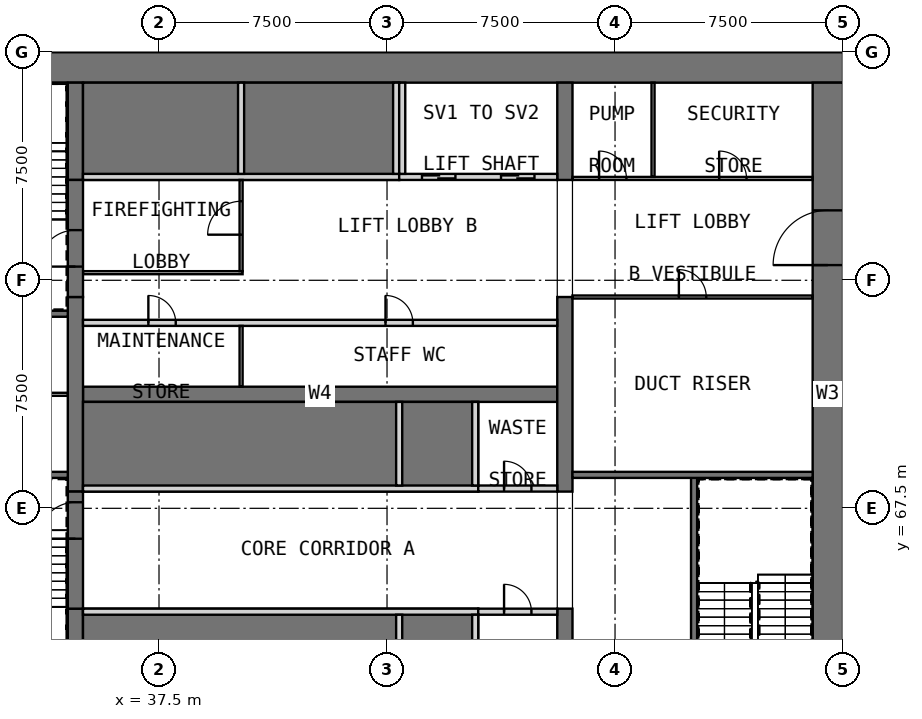
"""IFC4 building model, lengths in metres.
Left out: names, types, materials, properties, quantities, classifications, styles, units other than length and angle.
Written with IfcOpenShell. Run it as: python <this file> out.ifc"""

import sys

from ifc_helpers import new_model, si_unit, direction, frame, frame_2d, origin, place, context, subcontext, project, spatial, rectangle, extrude, element, fill, save


model = new_model("IFC4")
c1 = context("Model", 3, precision=1e-05, world=origin(), true_north=direction((0.0, 1.0)))
c2 = subcontext(c1, "Body", "Model", "MODEL_VIEW")
j1 = project(units=[si_unit("LENGTHUNIT", "METRE"), si_unit("PLANEANGLEUNIT", "RADIAN")], contexts=[c1])
p1 = place(None, origin())
s1 = spatial("IfcSite", under=j1, at=p1, CompositionType="ELEMENT")
p2 = place(p1, origin())
s2 = spatial("IfcBuilding", under=s1, at=p2, CompositionType="ELEMENT")
p3 = place(p2, frame((0.0, 0.0, -6.0)))
s3 = spatial("IfcBuildingStorey", under=s2, at=p3, CompositionType="ELEMENT", Elevation=-6.0)
p4 = place(p3, frame((30.0, 82.0, 0.0), z_axis=(0.0, 0.0, 1.0), x_axis=(1.0, 0.0, 0.0)))
e1 = element("IfcWall", 1, at=p4, inside=s3, PredefinedType="SHEAR", context=c2, shape_type="SweptSolid", body=[
    extrude(rectangle(XDim=30.0, YDim=1.0, at=frame_2d((15.0, 0.0))), origin(), (0.0, 0.0, 1.0), 6.0),
])
p5 = place(p3, frame((59.5, 61.0, 0.0), z_axis=(0.0, 0.0, 1.0), x_axis=(0.0, 1.0, 0.0)))
e2 = element("IfcWall", 2, at=p5, inside=s3, PredefinedType="SHEAR", context=c2, shape_type="SweptSolid", body=[
    extrude(rectangle(XDim=20.5, YDim=1.0, at=frame_2d((10.25, 0.0))), origin(), (0.0, 0.0, 1.0), 6.0),
])
p6 = place(p5, frame((14.5, 0.0, 0.0)))
e3 = element("IfcOpeningElement", 3, at=p6, cuts=e2, PredefinedType="OPENING", context=c2, shape_type="SweptSolid", body=[
    extrude(rectangle(XDim=1.8, YDim=2.1, at=frame_2d((0.9, 1.05))), frame((0.0, 0.51, 0.0), z_axis=(0.0, -1.0, 0.0), x_axis=(1.0, 0.0, 0.0)), (0.0, 0.0, 1.0), 1.02),
])
p7 = place(p3, frame((35.0, 71.25, 0.0), z_axis=(0.0, 0.0, 1.0), x_axis=(1.0, 0.0, 0.0)))
e4 = element("IfcWall", 4, at=p7, inside=s3, PredefinedType="SHEAR", context=c2, shape_type="SweptSolid", body=[
    extrude(rectangle(XDim=15.6, YDim=0.5, at=frame_2d((7.8, 0.0))), origin(), (0.0, 0.0, 1.0), 6.0),
])
p8 = place(p3, frame((34.75, 61.0, 0.0), z_axis=(0.0, 0.0, 1.0), x_axis=(0.0, 1.0, 0.0)))
e5 = element("IfcWall", 5, at=p8, inside=s3, PredefinedType="SHEAR", context=c2, shape_type="SweptSolid", body=[
    extrude(rectangle(XDim=3.2, YDim=0.5, at=frame_2d((1.6, 0.0))), origin(), (0.0, 0.0, 1.0), 6.0),
])
p9 = place(p3, frame((34.75, 68.05, 0.0), z_axis=(0.0, 0.0, 1.0), x_axis=(0.0, 1.0, 0.0)))
e6 = element("IfcWall", 6, at=p9, inside=s3, PredefinedType="SHEAR", context=c2, shape_type="SweptSolid", body=[
    extrude(rectangle(XDim=6.4, YDim=0.5, at=frame_2d((3.2, 0.0))), origin(), (0.0, 0.0, 1.0), 6.0),
])
for number, where, z_axis, x_axis in (
    (7, (34.75, 78.3, 0.0), (0.0, 0.0, 1.0), (0.0, 1.0, 0.0)),
    (8, (50.85, 61.0, 0.0), (0.0, 0.0, 1.0), (0.0, 1.0, 0.0)),
):
    element("IfcWall", number, at=place(p3, frame(where, z_axis=z_axis, x_axis=x_axis)), inside=s3, PredefinedType="SHEAR", context=c2, shape_type="SweptSolid", body=[
        extrude(rectangle(XDim=3.2, YDim=0.5, at=frame_2d((1.6, 0.0))), origin(), (0.0, 0.0, 1.0), 6.0),
    ])
p10 = place(p3, frame((50.85, 68.05, 0.0), z_axis=(0.0, 0.0, 1.0), x_axis=(0.0, 1.0, 0.0)))
e9 = element("IfcWall", 9, at=p10, inside=s3, PredefinedType="SHEAR", context=c2, shape_type="SweptSolid", body=[
    extrude(rectangle(XDim=6.4, YDim=0.5, at=frame_2d((3.2, 0.0))), origin(), (0.0, 0.0, 1.0), 6.0),
])
p11 = place(p3, frame((50.85, 78.3, 0.0), z_axis=(0.0, 0.0, 1.0), x_axis=(0.0, 1.0, 0.0)))
e10 = element("IfcWall", 10, at=p11, inside=s3, PredefinedType="SHEAR", context=c2, shape_type="SweptSolid", body=[
    extrude(rectangle(XDim=3.2, YDim=0.5, at=frame_2d((1.6, 0.0))), origin(), (0.0, 0.0, 1.0), 6.0),
])
p12 = place(p3, frame((35.0, 62.6, 0.0), z_axis=(0.0, 0.0, 1.0), x_axis=(1.0, 0.0, 0.0)))
e11 = element("IfcWall", 11, at=p12, inside=s3, PredefinedType="SOLIDWALL", context=c2, shape_type="SweptSolid", body=[
    extrude(rectangle(XDim=13.0, YDim=3.2, at=frame_2d((6.5, 0.0))), origin(), (0.0, 0.0, 1.0), 4.4),
])
p13 = place(p3, frame((35.0, 64.1, 4.4), z_axis=(0.0, 0.0, 1.0), x_axis=(1.0, 0.0, 0.0)))
e12 = element("IfcWall", 12, at=p13, inside=s3, PredefinedType="SOLIDWALL", context=c2, shape_type="SweptSolid", body=[
    extrude(rectangle(XDim=13.0, YDim=0.2, at=frame_2d((6.5, 0.0))), origin(), (0.0, 0.0, 1.0), 1.6),
])
for number, where, z_axis, x_axis in (
    (13, (45.4, 61.0, 4.4), (0.0, 0.0, 1.0), (0.0, 1.0, 0.0)),
    (14, (47.9, 61.0, 4.4), (0.0, 0.0, 1.0), (0.0, 1.0, 0.0)),
):
    element("IfcWall", number, at=place(p3, frame(where, z_axis=z_axis, x_axis=x_axis)), inside=s3, PredefinedType="SOLIDWALL", context=c2, shape_type="SweptSolid", body=[
        extrude(rectangle(XDim=3.0, YDim=0.2, at=frame_2d((1.5, 0.0))), origin(), (0.0, 0.0, 1.0), 1.6),
    ])
p14 = place(p3, frame((48.0, 64.1, 0.0), z_axis=(0.0, 0.0, 1.0), x_axis=(1.0, 0.0, 0.0)))
e15 = element("IfcWall", 15, at=p14, inside=s3, PredefinedType="PARTITIONING", context=c2, shape_type="SweptSolid", body=[
    extrude(rectangle(XDim=2.6, YDim=0.2, at=frame_2d((1.3, 0.0))), origin(), (0.0, 0.0, 1.0), 5.7),
])
p15 = place(p14, frame((0.85, 0.0, 0.0)))
e16 = element("IfcOpeningElement", 16, at=p15, cuts=e15, PredefinedType="OPENING", context=c2, shape_type="SweptSolid", body=[
    extrude(rectangle(XDim=0.9, YDim=2.1, at=frame_2d((0.45, 1.05))), frame((0.0, 0.11, 0.0), z_axis=(0.0, -1.0, 0.0), x_axis=(1.0, 0.0, 0.0)), (0.0, 0.0, 1.0), 0.22),
])
p16 = place(p3, frame((35.0, 69.525, 0.0), z_axis=(0.0, 0.0, 1.0), x_axis=(1.0, 0.0, 0.0)))
e17 = element("IfcWall", 17, at=p16, inside=s3, PredefinedType="SOLIDWALL", context=c2, shape_type="SweptSolid", body=[
    extrude(rectangle(XDim=13.0, YDim=2.95, at=frame_2d((6.5, 0.0))), origin(), (0.0, 0.0, 1.0), 4.4),
])
p17 = place(p3, frame((35.0, 68.15, 4.4), z_axis=(0.0, 0.0, 1.0), x_axis=(1.0, 0.0, 0.0)))
e18 = element("IfcWall", 18, at=p17, inside=s3, PredefinedType="SOLIDWALL", context=c2, shape_type="SweptSolid", body=[
    extrude(rectangle(XDim=13.0, YDim=0.2, at=frame_2d((6.5, 0.0))), origin(), (0.0, 0.0, 1.0), 1.6),
])
for number, where, z_axis, x_axis in (
    (19, (45.4, 68.25, 4.4), (0.0, 0.0, 1.0), (0.0, 1.0, 0.0)),
    (20, (47.9, 68.25, 4.4), (0.0, 0.0, 1.0), (0.0, 1.0, 0.0)),
):
    element("IfcWall", number, at=place(p3, frame(where, z_axis=z_axis, x_axis=x_axis)), inside=s3, PredefinedType="SOLIDWALL", context=c2, shape_type="SweptSolid", body=[
        extrude(rectangle(XDim=2.75, YDim=0.2, at=frame_2d((1.375, 0.0))), origin(), (0.0, 0.0, 1.0), 1.6),
    ])
p18 = place(p3, frame((48.0, 68.15, 0.0), z_axis=(0.0, 0.0, 1.0), x_axis=(1.0, 0.0, 0.0)))
e21 = element("IfcWall", 21, at=p18, inside=s3, PredefinedType="PARTITIONING", context=c2, shape_type="SweptSolid", body=[
    extrude(rectangle(XDim=2.6, YDim=0.2, at=frame_2d((1.3, 0.0))), origin(), (0.0, 0.0, 1.0), 5.7),
])
p19 = place(p18, frame((0.85, 0.0, 0.0)))
e22 = element("IfcOpeningElement", 22, at=p19, cuts=e21, PredefinedType="OPENING", context=c2, shape_type="SweptSolid", body=[
    extrude(rectangle(XDim=0.9, YDim=2.1, at=frame_2d((0.45, 1.05))), frame((0.0, 0.11, 0.0), z_axis=(0.0, -1.0, 0.0), x_axis=(1.0, 0.0, 0.0)), (0.0, 0.0, 1.0), 0.22),
])
p20 = place(p3, frame((35.0, 73.6, 0.0), z_axis=(0.0, 0.0, 1.0), x_axis=(1.0, 0.0, 0.0)))
e23 = element("IfcWall", 23, at=p20, inside=s3, PredefinedType="PARTITIONING", context=c2, shape_type="SweptSolid", body=[
    extrude(rectangle(XDim=15.6, YDim=0.2, at=frame_2d((7.8, 0.0))), origin(), (0.0, 0.0, 1.0), 5.7),
])
p21 = place(p20, frame((2.15, 0.0, 0.0)))
e24 = element("IfcOpeningElement", 24, at=p21, cuts=e23, PredefinedType="OPENING", context=c2, shape_type="SweptSolid", body=[
    extrude(rectangle(XDim=0.9, YDim=2.1, at=frame_2d((0.45, 1.05))), frame((0.0, 0.11, 0.0), z_axis=(0.0, -1.0, 0.0), x_axis=(1.0, 0.0, 0.0)), (0.0, 0.0, 1.0), 0.22),
])
p22 = place(p20, frame((9.95, 0.0, 0.0)))
e25 = element("IfcOpeningElement", 25, at=p22, cuts=e23, PredefinedType="OPENING", context=c2, shape_type="SweptSolid", body=[
    extrude(rectangle(XDim=0.9, YDim=2.1, at=frame_2d((0.45, 1.05))), frame((0.0, 0.11, 0.0), z_axis=(0.0, -1.0, 0.0), x_axis=(1.0, 0.0, 0.0)), (0.0, 0.0, 1.0), 0.22),
])
p23 = place(p3, frame((40.2, 71.5, 0.0), z_axis=(0.0, 0.0, 1.0), x_axis=(0.0, 1.0, 0.0)))
e26 = element("IfcWall", 26, at=p23, inside=s3, PredefinedType="PARTITIONING", context=c2, shape_type="SweptSolid", body=[
    extrude(rectangle(XDim=2.0, YDim=0.1, at=frame_2d((1.0, 0.0))), origin(), (0.0, 0.0, 1.0), 5.7),
])
p24 = place(p3, frame((35.0, 79.9, 0.0), z_axis=(0.0, 0.0, 1.0), x_axis=(1.0, 0.0, 0.0)))
e27 = element("IfcWall", 27, at=p24, inside=s3, PredefinedType="SOLIDWALL", context=c2, shape_type="SweptSolid", body=[
    extrude(rectangle(XDim=10.4, YDim=3.2, at=frame_2d((5.2, 0.0))), origin(), (0.0, 0.0, 1.0), 4.4),
])
p25 = place(p3, frame((35.0, 78.4, 4.4), z_axis=(0.0, 0.0, 1.0), x_axis=(1.0, 0.0, 0.0)))
e28 = element("IfcWall", 28, at=p25, inside=s3, PredefinedType="SOLIDWALL", context=c2, shape_type="SweptSolid", body=[
    extrude(rectangle(XDim=10.4, YDim=0.2, at=frame_2d((5.2, 0.0))), origin(), (0.0, 0.0, 1.0), 1.6),
])
for number, where, z_axis, x_axis in (
    (29, (40.2, 78.5, 4.4), (0.0, 0.0, 1.0), (0.0, 1.0, 0.0)),
    (30, (45.3, 78.5, 4.4), (0.0, 0.0, 1.0), (0.0, 1.0, 0.0)),
):
    element("IfcWall", number, at=place(p3, frame(where, z_axis=z_axis, x_axis=x_axis)), inside=s3, PredefinedType="SOLIDWALL", context=c2, shape_type="SweptSolid", body=[
        extrude(rectangle(XDim=3.0, YDim=0.2, at=frame_2d((1.5, 0.0))), origin(), (0.0, 0.0, 1.0), 1.6),
    ])
p26 = place(p3, frame((45.4, 78.4, 0.0), z_axis=(0.0, 0.0, 1.0), x_axis=(1.0, 0.0, 0.0)))
e31 = element("IfcWall", 31, at=p26, inside=s3, PredefinedType="SOLIDWALL", context=c2, shape_type="SweptSolid", body=[
    extrude(rectangle(XDim=5.2, YDim=0.2, at=frame_2d((2.6, 0.0))), origin(), (0.0, 0.0, 1.0), 6.0),
])
p27 = place(p26, frame((0.75, 0.0, 0.0)))
e32 = element("IfcOpeningElement", 32, at=p27, cuts=e31, PredefinedType="OPENING", context=c2, shape_type="SweptSolid", body=[
    extrude(rectangle(XDim=1.1, YDim=2.1, at=frame_2d((0.55, 1.05))), frame((0.0, 0.11, 0.0), z_axis=(0.0, -1.0, 0.0), x_axis=(1.0, 0.0, 0.0)), (0.0, 0.0, 1.0), 0.22),
])
p28 = place(p26, frame((3.35, 0.0, 0.0)))
e33 = element("IfcOpeningElement", 33, at=p28, cuts=e31, PredefinedType="OPENING", context=c2, shape_type="SweptSolid", body=[
    extrude(rectangle(XDim=1.1, YDim=2.1, at=frame_2d((0.55, 1.05))), frame((0.0, 0.11, 0.0), z_axis=(0.0, -1.0, 0.0), x_axis=(1.0, 0.0, 0.0)), (0.0, 0.0, 1.0), 0.22),
])
p29 = place(p3, frame((45.5, 78.5, 0.0), z_axis=(0.0, 0.0, 1.0), x_axis=(0.0, 1.0, 0.0)))
e34 = element("IfcWall", 34, at=p29, inside=s3, PredefinedType="SOLIDWALL", context=c2, shape_type="SweptSolid", body=[
    extrude(rectangle(XDim=3.0, YDim=0.2, at=frame_2d((1.5, 0.0))), origin(), (0.0, 0.0, 1.0), 6.0),
])
p30 = place(p3, frame((35.0, 75.25, 0.0), z_axis=(0.0, 0.0, 1.0), x_axis=(1.0, 0.0, 0.0)))
e35 = element("IfcWall", 35, at=p30, inside=s3, PredefinedType="PARTITIONING", context=c2, shape_type="SweptSolid", body=[
    extrude(rectangle(XDim=5.25, YDim=0.1, at=frame_2d((2.625, 0.0))), origin(), (0.0, 0.0, 1.0), 5.7),
])
p31 = place(p3, frame((40.2, 75.3, 0.0), z_axis=(0.0, 0.0, 1.0), x_axis=(0.0, 1.0, 0.0)))
e36 = element("IfcWall", 36, at=p31, inside=s3, PredefinedType="PARTITIONING", context=c2, shape_type="SweptSolid", body=[
    extrude(rectangle(XDim=3.0, YDim=0.1, at=frame_2d((1.5, 0.0))), origin(), (0.0, 0.0, 1.0), 5.7),
])
p32 = place(p31, frame((1.2, 0.0, 0.0)))
e37 = element("IfcOpeningElement", 37, at=p32, cuts=e36, PredefinedType="OPENING", context=c2, shape_type="SweptSolid", body=[
    extrude(rectangle(XDim=1.1, YDim=2.1, at=frame_2d((0.55, 1.05))), frame((0.0, 0.06, 0.0), z_axis=(0.0, -1.0, 0.0), x_axis=(1.0, 0.0, 0.0)), (0.0, 0.0, 1.0), 0.12),
])
p33 = place(p3, frame((34.75, 64.2, 0.0), z_axis=(0.0, 0.0, 1.0), x_axis=(0.0, 1.0, 0.0)))
e38 = element("IfcWall", 38, at=p33, inside=s3, PredefinedType="SOLIDWALL", context=c2, shape_type="SweptSolid", body=[
    extrude(rectangle(XDim=3.85, YDim=0.5, at=frame_2d((1.925, 0.0))), origin(), (0.0, 0.0, 1.0), 4.8),
])
p34 = place(p33, frame((2.3, 0.0, 0.0)))
e39 = element("IfcOpeningElement", 39, at=p34, cuts=e38, PredefinedType="OPENING", context=c2, shape_type="SweptSolid", body=[
    extrude(rectangle(XDim=1.2, YDim=2.1, at=frame_2d((0.6, 1.05))), frame((0.0, 0.26, 0.0), z_axis=(0.0, -1.0, 0.0), x_axis=(1.0, 0.0, 0.0)), (0.0, 0.0, 1.0), 0.52),
])
p35 = place(p3, frame((34.75, 74.45, 0.0), z_axis=(0.0, 0.0, 1.0), x_axis=(0.0, 1.0, 0.0)))
e40 = element("IfcWall", 40, at=p35, inside=s3, PredefinedType="SOLIDWALL", context=c2, shape_type="SweptSolid", body=[
    extrude(rectangle(XDim=3.85, YDim=0.5, at=frame_2d((1.925, 0.0))), origin(), (0.0, 0.0, 1.0), 4.8),
])
p36 = place(p35, frame((1.0, 0.0, 0.0)))
e41 = element("IfcOpeningElement", 41, at=p36, cuts=e40, PredefinedType="OPENING", context=c2, shape_type="SweptSolid", body=[
    extrude(rectangle(XDim=1.2, YDim=2.1, at=frame_2d((0.6, 1.05))), frame((0.0, 0.26, 0.0), z_axis=(0.0, -1.0, 0.0), x_axis=(1.0, 0.0, 0.0)), (0.0, 0.0, 1.0), 0.52),
])
p37 = place(p3, frame((31.0, 68.6, 0.0), z_axis=(0.0, 0.0, 1.0), x_axis=(1.0, 0.0, 0.0)))
e42 = element("IfcWall", 42, at=p37, inside=s3, PredefinedType="SOLIDWALL", context=c2, shape_type="SweptSolid", body=[
    extrude(rectangle(XDim=3.5, YDim=0.2, at=frame_2d((1.75, 0.0))), origin(), (0.0, 0.0, 1.0), 5.7),
])
p38 = place(p37, frame((1.3, 0.0, 0.0)))
e43 = element("IfcOpeningElement", 43, at=p38, cuts=e42, PredefinedType="OPENING", context=c2, shape_type="SweptSolid", body=[
    extrude(rectangle(XDim=0.9, YDim=2.1, at=frame_2d((0.45, 1.05))), frame((0.0, 0.11, 0.0), z_axis=(0.0, -1.0, 0.0), x_axis=(1.0, 0.0, 0.0)), (0.0, 0.0, 1.0), 0.22),
])
p39 = place(p3, frame((31.0, 73.9, 0.0), z_axis=(0.0, 0.0, 1.0), x_axis=(1.0, 0.0, 0.0)))
e44 = element("IfcWall", 44, at=p39, inside=s3, PredefinedType="SOLIDWALL", context=c2, shape_type="SweptSolid", body=[
    extrude(rectangle(XDim=3.5, YDim=0.2, at=frame_2d((1.75, 0.0))), origin(), (0.0, 0.0, 1.0), 5.7),
])
p40 = place(p39, frame((1.3, 0.0, 0.0)))
e45 = element("IfcOpeningElement", 45, at=p40, cuts=e44, PredefinedType="OPENING", context=c2, shape_type="SweptSolid", body=[
    extrude(rectangle(XDim=0.9, YDim=2.1, at=frame_2d((0.45, 1.05))), frame((0.0, 0.11, 0.0), z_axis=(0.0, -1.0, 0.0), x_axis=(1.0, 0.0, 0.0)), (0.0, 0.0, 1.0), 0.22),
])
p41 = place(p3, frame((55.1, 61.0, 0.0), z_axis=(0.0, 0.0, 1.0), x_axis=(0.0, 1.0, 0.0)))
e46 = element("IfcWall", 46, at=p41, inside=s3, PredefinedType="SOLIDWALL", context=c2, shape_type="SweptSolid", body=[
    extrude(rectangle(XDim=7.6, YDim=0.2, at=frame_2d((3.8, 0.0))), origin(), (0.0, 0.0, 1.0), 5.7),
])
p42 = place(p3, frame((51.1, 68.6, 0.0), z_axis=(0.0, 0.0, 1.0), x_axis=(1.0, 0.0, 0.0)))
e47 = element("IfcWall", 47, at=p42, inside=s3, PredefinedType="SOLIDWALL", context=c2, shape_type="SweptSolid", body=[
    extrude(rectangle(XDim=7.9, YDim=0.2, at=frame_2d((3.95, 0.0))), origin(), (0.0, 0.0, 1.0), 5.7),
])
p43 = place(p3, frame((31.0, 71.25, 0.0), z_axis=(0.0, 0.0, 1.0), x_axis=(1.0, 0.0, 0.0)))
e48 = element("IfcWall", 48, at=p43, inside=s3, PredefinedType="PARTITIONING", context=c2, shape_type="SweptSolid", body=[
    extrude(rectangle(XDim=3.5, YDim=0.1, at=frame_2d((1.75, 0.0))), origin(), (0.0, 0.0, 1.0), 5.7),
])
p44 = place(p3, frame((51.1, 74.45, 0.0), z_axis=(0.0, 0.0, 1.0), x_axis=(1.0, 0.0, 0.0)))
e49 = element("IfcWall", 49, at=p44, inside=s3, PredefinedType="PARTITIONING", context=c2, shape_type="SweptSolid", body=[
    extrude(rectangle(XDim=7.9, YDim=0.1, at=frame_2d((3.95, 0.0))), origin(), (0.0, 0.0, 1.0), 5.7),
])
p45 = place(p44, frame((3.5, 0.0, 0.0)))
e50 = element("IfcOpeningElement", 50, at=p45, cuts=e49, PredefinedType="OPENING", context=c2, shape_type="SweptSolid", body=[
    extrude(rectangle(XDim=0.9, YDim=2.1, at=frame_2d((0.45, 1.05))), frame((0.0, 0.06, 0.0), z_axis=(0.0, -1.0, 0.0), x_axis=(1.0, 0.0, 0.0)), (0.0, 0.0, 1.0), 0.12),
])
p46 = place(p3, frame((51.1, 78.35, 0.0), z_axis=(0.0, 0.0, 1.0), x_axis=(1.0, 0.0, 0.0)))
e51 = element("IfcWall", 51, at=p46, inside=s3, PredefinedType="PARTITIONING", context=c2, shape_type="SweptSolid", body=[
    extrude(rectangle(XDim=7.9, YDim=0.1, at=frame_2d((3.95, 0.0))), origin(), (0.0, 0.0, 1.0), 5.7),
])
p47 = place(p46, frame((0.875, 0.0, 0.0)))
e52 = element("IfcOpeningElement", 52, at=p47, cuts=e51, PredefinedType="OPENING", context=c2, shape_type="SweptSolid", body=[
    extrude(rectangle(XDim=0.9, YDim=2.1, at=frame_2d((0.45, 1.05))), frame((0.0, 0.06, 0.0), z_axis=(0.0, -1.0, 0.0), x_axis=(1.0, 0.0, 0.0)), (0.0, 0.0, 1.0), 0.12),
])
p48 = place(p46, frame((4.825, 0.0, 0.0)))
e53 = element("IfcOpeningElement", 53, at=p48, cuts=e51, PredefinedType="OPENING", context=c2, shape_type="SweptSolid", body=[
    extrude(rectangle(XDim=0.9, YDim=2.1, at=frame_2d((0.45, 1.05))), frame((0.0, 0.06, 0.0), z_axis=(0.0, -1.0, 0.0), x_axis=(1.0, 0.0, 0.0)), (0.0, 0.0, 1.0), 0.12),
])
p49 = place(p3, frame((53.75, 78.4, 0.0), z_axis=(0.0, 0.0, 1.0), x_axis=(0.0, 1.0, 0.0)))
e54 = element("IfcWall", 54, at=p49, inside=s3, PredefinedType="PARTITIONING", context=c2, shape_type="SweptSolid", body=[
    extrude(rectangle(XDim=3.1, YDim=0.1, at=frame_2d((1.55, 0.0))), origin(), (0.0, 0.0, 1.0), 5.7),
])
p50 = place(p15, origin())
e55 = element("IfcDoor", 55, at=p50, inside=s3, OperationType="SINGLE_SWING_LEFT", PredefinedType="DOOR", context=c2, shape_type="SweptSolid", body=[
    extrude(rectangle(XDim=0.9, YDim=2.1, at=frame_2d((0.45, 1.05))), frame((0.0, 0.025, 0.0), z_axis=(0.0, -1.0, 0.0), x_axis=(1.0, 0.0, 0.0)), (0.0, 0.0, 1.0), 0.05),
])
fill(e16, e55)
p51 = place(p19, origin())
e56 = element("IfcDoor", 56, at=p51, inside=s3, OperationType="SINGLE_SWING_LEFT", PredefinedType="DOOR", context=c2, shape_type="SweptSolid", body=[
    extrude(rectangle(XDim=0.9, YDim=2.1, at=frame_2d((0.45, 1.05))), frame((0.0, 0.025, 0.0), z_axis=(0.0, -1.0, 0.0), x_axis=(1.0, 0.0, 0.0)), (0.0, 0.0, 1.0), 0.05),
])
fill(e22, e56)
p52 = place(p21, origin())
e57 = element("IfcDoor", 57, at=p52, inside=s3, OperationType="SINGLE_SWING_LEFT", PredefinedType="DOOR", context=c2, shape_type="SweptSolid", body=[
    extrude(rectangle(XDim=0.9, YDim=2.1, at=frame_2d((0.45, 1.05))), frame((0.0, 0.025, 0.0), z_axis=(0.0, -1.0, 0.0), x_axis=(1.0, 0.0, 0.0)), (0.0, 0.0, 1.0), 0.05),
])
fill(e24, e57)
p53 = place(p22, origin())
e58 = element("IfcDoor", 58, at=p53, inside=s3, OperationType="SINGLE_SWING_RIGHT", PredefinedType="DOOR", context=c2, shape_type="SweptSolid", body=[
    extrude(rectangle(XDim=0.9, YDim=2.1, at=frame_2d((0.45, 1.05))), frame((0.0, 0.025, 0.0), z_axis=(0.0, -1.0, 0.0), x_axis=(1.0, 0.0, 0.0)), (0.0, 0.0, 1.0), 0.05),
])
fill(e25, e58)
p54 = place(p27, origin())
e59 = element("IfcDoor", 59, at=p54, inside=s3, OperationType="DOUBLE_DOOR_SLIDING", PredefinedType="DOOR", context=c2, shape_type="SweptSolid", body=[
    extrude(rectangle(XDim=1.1, YDim=2.1, at=frame_2d((0.55, 1.05))), frame((0.0, 0.025, 0.0), z_axis=(0.0, -1.0, 0.0), x_axis=(1.0, 0.0, 0.0)), (0.0, 0.0, 1.0), 0.05),
])
fill(e32, e59)
p55 = place(p28, origin())
e60 = element("IfcDoor", 60, at=p55, inside=s3, OperationType="DOUBLE_DOOR_SLIDING", PredefinedType="DOOR", context=c2, shape_type="SweptSolid", body=[
    extrude(rectangle(XDim=1.1, YDim=2.1, at=frame_2d((0.55, 1.05))), frame((0.0, 0.025, 0.0), z_axis=(0.0, -1.0, 0.0), x_axis=(1.0, 0.0, 0.0)), (0.0, 0.0, 1.0), 0.05),
])
fill(e33, e60)
p56 = place(p6, origin())
e61 = element("IfcDoor", 61, at=p56, inside=s3, OperationType="DOUBLE_DOOR_SINGLE_SWING", PredefinedType="DOOR", context=c2, shape_type="SweptSolid", body=[
    extrude(rectangle(XDim=1.8, YDim=2.1, at=frame_2d((0.9, 1.05))), frame((0.0, 0.025, 0.0), z_axis=(0.0, -1.0, 0.0), x_axis=(1.0, 0.0, 0.0)), (0.0, 0.0, 1.0), 0.05),
])
fill(e3, e61)
p57 = place(p32, origin())
e62 = element("IfcDoor", 62, at=p57, inside=s3, OperationType="SINGLE_SWING_LEFT", PredefinedType="DOOR", context=c2, shape_type="SweptSolid", body=[
    extrude(rectangle(XDim=1.1, YDim=2.1, at=frame_2d((0.55, 1.05))), frame((0.0, 0.025, 0.0), z_axis=(0.0, -1.0, 0.0), x_axis=(1.0, 0.0, 0.0)), (0.0, 0.0, 1.0), 0.05),
])
fill(e37, e62)
p58 = place(p34, origin())
e63 = element("IfcDoor", 63, at=p58, inside=s3, OperationType="SINGLE_SWING_LEFT", PredefinedType="DOOR", context=c2, shape_type="SweptSolid", body=[
    extrude(rectangle(XDim=1.2, YDim=2.1, at=frame_2d((0.6, 1.05))), frame((0.0, 0.025, 0.0), z_axis=(0.0, -1.0, 0.0), x_axis=(1.0, 0.0, 0.0)), (0.0, 0.0, 1.0), 0.05),
])
fill(e39, e63)
p59 = place(p36, origin())
e64 = element("IfcDoor", 64, at=p59, inside=s3, OperationType="SINGLE_SWING_RIGHT", PredefinedType="DOOR", context=c2, shape_type="SweptSolid", body=[
    extrude(rectangle(XDim=1.2, YDim=2.1, at=frame_2d((0.6, 1.05))), frame((0.0, 0.025, 0.0), z_axis=(0.0, -1.0, 0.0), x_axis=(1.0, 0.0, 0.0)), (0.0, 0.0, 1.0), 0.05),
])
fill(e41, e64)
p60 = place(p45, origin())
e65 = element("IfcDoor", 65, at=p60, inside=s3, OperationType="SINGLE_SWING_LEFT", PredefinedType="DOOR", context=c2, shape_type="SweptSolid", body=[
    extrude(rectangle(XDim=0.9, YDim=2.1, at=frame_2d((0.45, 1.05))), frame((0.0, 0.025, 0.0), z_axis=(0.0, -1.0, 0.0), x_axis=(1.0, 0.0, 0.0)), (0.0, 0.0, 1.0), 0.05),
])
fill(e50, e65)
p61 = place(p47, origin())
e66 = element("IfcDoor", 66, at=p61, inside=s3, OperationType="SINGLE_SWING_LEFT", PredefinedType="DOOR", context=c2, shape_type="SweptSolid", body=[
    extrude(rectangle(XDim=0.9, YDim=2.1, at=frame_2d((0.45, 1.05))), frame((0.0, 0.025, 0.0), z_axis=(0.0, -1.0, 0.0), x_axis=(1.0, 0.0, 0.0)), (0.0, 0.0, 1.0), 0.05),
])
fill(e52, e66)
p62 = place(p48, origin())
e67 = element("IfcDoor", 67, at=p62, inside=s3, OperationType="SINGLE_SWING_RIGHT", PredefinedType="DOOR", context=c2, shape_type="SweptSolid", body=[
    extrude(rectangle(XDim=0.9, YDim=2.1, at=frame_2d((0.45, 1.05))), frame((0.0, 0.025, 0.0), z_axis=(0.0, -1.0, 0.0), x_axis=(1.0, 0.0, 0.0)), (0.0, 0.0, 1.0), 0.05),
])
fill(e53, e67)
save(model, sys.argv[1])
